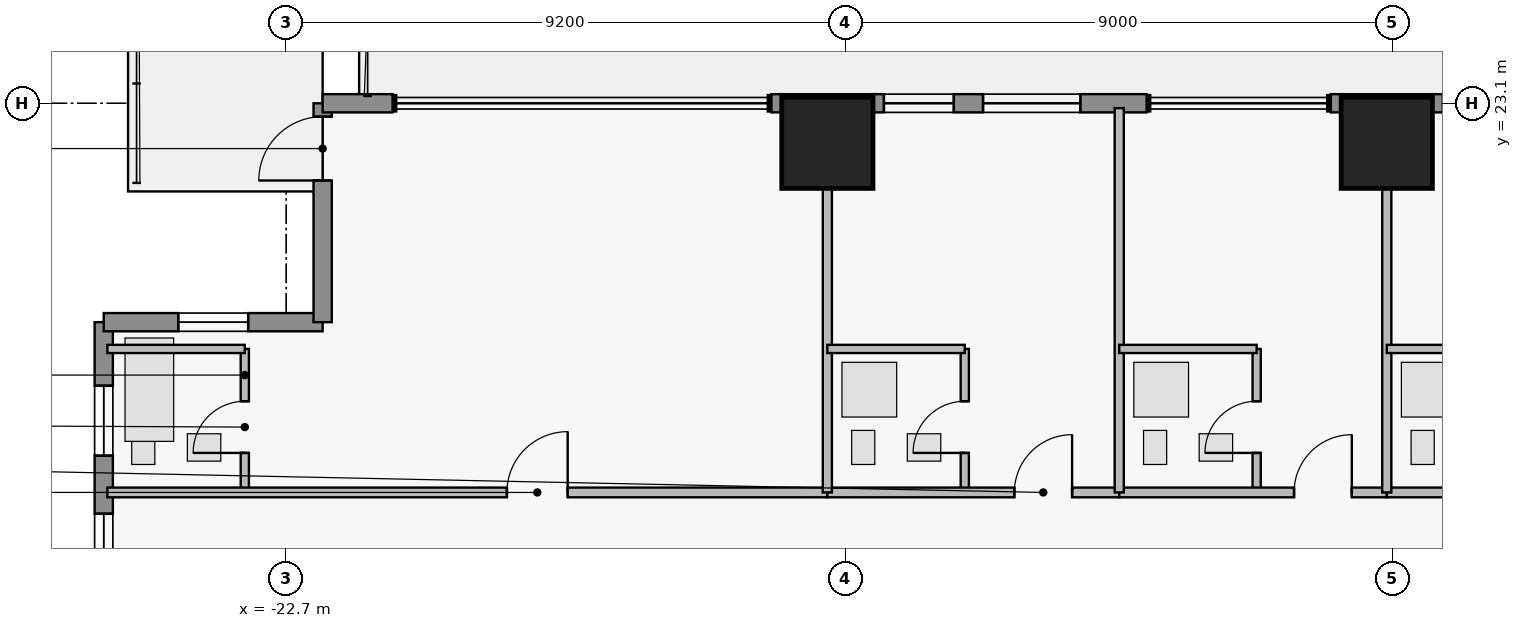
"""IFC4 building model, lengths in metres.
Left out: names, types, materials, properties, quantities, classifications, styles, units other than length and angle.
Written with IfcOpenShell. Run it as: python <this file> out.ifc"""

import sys

from ifc_helpers import new_model, si_unit, direction, frame, frame_2d, origin, origin_2d, place, context, subcontext, project, spatial, rectangle, extrude, element, fill, save


model = new_model("IFC4")
c1 = context("Model", 3, precision=1e-05, world=origin(), true_north=direction((0.0, 1.0)))
c2 = subcontext(c1, "Body", "Model", "MODEL_VIEW")
j1 = project(units=[si_unit("LENGTHUNIT", "METRE"), si_unit("PLANEANGLEUNIT", "RADIAN")], contexts=[c1])
p1 = place(None, origin())
s1 = spatial("IfcSite", under=j1, at=p1, CompositionType="ELEMENT")
p2 = place(p1, origin())
s2 = spatial("IfcBuilding", under=s1, at=p2, CompositionType="ELEMENT")
p3 = place(p2, frame((0.0, 0.0, 60.45)))
s3 = spatial("IfcBuildingStorey", under=s2, at=p3, CompositionType="ELEMENT", Elevation=60.45)
for number, where, z_axis, x_axis in (
    (1, (-13.8, 22.45, 0.0), (0.0, 0.0, 1.0), (1.0, 0.0, 0.0)),
    (2, (-4.6, 22.45, 0.0), (0.0, 0.0, 1.0), (1.0, 0.0, 0.0)),
):
    element("IfcColumn", number, at=place(p3, frame(where, z_axis=z_axis, x_axis=x_axis)), inside=s3, PredefinedType="COLUMN", context=c2, shape_type="SweptSolid", body=[
        extrude(rectangle(XDim=1.5, YDim=1.5, at=origin_2d()), origin(), (0.0, 0.0, 1.0), 3.65),
    ])
p4 = place(p3, frame((-25.7, 14.4, 0.0), z_axis=(0.0, 0.0, 1.0), x_axis=(0.0, 1.0, 0.0)))
e3 = element("IfcWall", 3, at=p4, inside=s3, PredefinedType="STANDARD", context=c2, shape_type="SweptSolid", body=[
    extrude(rectangle(XDim=5.1, YDim=0.3, at=frame_2d((2.55, 0.0))), origin(), (0.0, 0.0, 1.0), 3.43),
])
p5 = place(p4, frame((0.8, 0.0, 0.95)))
e4 = element("IfcOpeningElement", 4, at=p5, cuts=e3, PredefinedType="OPENING", context=c2, shape_type="SweptSolid", body=[
    extrude(rectangle(XDim=1.15, YDim=1.55, at=frame_2d((0.575, 0.775))), frame((0.0, 0.16, 0.0), z_axis=(0.0, -1.0, 0.0), x_axis=(1.0, 0.0, 0.0)), (0.0, 0.0, 1.0), 0.32),
])
p6 = place(p4, frame((2.905, 0.0, 0.95)))
e5 = element("IfcOpeningElement", 5, at=p6, cuts=e3, PredefinedType="OPENING", context=c2, shape_type="SweptSolid", body=[
    extrude(rectangle(XDim=1.15, YDim=1.55, at=frame_2d((0.575, 0.775))), frame((0.0, 0.16, 0.0), z_axis=(0.0, -1.0, 0.0), x_axis=(1.0, 0.0, 0.0)), (0.0, 0.0, 1.0), 0.32),
])
p7 = place(p3, frame((-25.7, 19.5, 0.0), z_axis=(0.0, 0.0, 1.0), x_axis=(1.0, 0.0, 0.0)))
e6 = element("IfcWall", 6, at=p7, inside=s3, PredefinedType="STANDARD", context=c2, shape_type="SweptSolid", body=[
    extrude(rectangle(XDim=3.6, YDim=0.3, at=frame_2d((1.8, 0.0))), origin(), (0.0, 0.0, 1.0), 3.43),
])
p8 = place(p7, frame((1.225, 0.0, 1.25)))
e7 = element("IfcOpeningElement", 7, at=p8, cuts=e6, PredefinedType="OPENING", context=c2, shape_type="SweptSolid", body=[
    extrude(rectangle(XDim=1.15, YDim=1.55, at=frame_2d((0.575, 0.775))), frame((0.0, 0.16, 0.0), z_axis=(0.0, -1.0, 0.0), x_axis=(1.0, 0.0, 0.0)), (0.0, 0.0, 1.0), 0.32),
])
p9 = place(p3, frame((-22.1, 19.5, 0.0), z_axis=(0.0, 0.0, 1.0), x_axis=(0.0, 1.0, 0.0)))
e8 = element("IfcWall", 8, at=p9, inside=s3, PredefinedType="STANDARD", context=c2, shape_type="SweptSolid", body=[
    extrude(rectangle(XDim=3.6, YDim=0.3, at=frame_2d((1.8, 0.0))), origin(), (0.0, 0.0, 1.0), 3.43),
])
p10 = place(p9, frame((2.33, 0.0, 0.0)))
e9 = element("IfcOpeningElement", 9, at=p10, cuts=e8, PredefinedType="OPENING", context=c2, shape_type="SweptSolid", body=[
    extrude(rectangle(XDim=1.05, YDim=2.2, at=frame_2d((0.525, 1.1))), frame((0.0, 0.16, 0.0), z_axis=(0.0, -1.0, 0.0), x_axis=(1.0, 0.0, 0.0)), (0.0, 0.0, 1.0), 0.32),
])
p11 = place(p3, frame((-22.1, 23.1, 0.0), z_axis=(0.0, 0.0, 1.0), x_axis=(1.0, 0.0, 0.0)))
e10 = element("IfcWall", 10, at=p11, inside=s3, PredefinedType="STANDARD", context=c2, shape_type="SweptSolid", body=[
    extrude(rectangle(XDim=1.15, YDim=0.3, at=frame_2d((0.575, 0.0))), origin(), (0.0, 0.0, 1.0), 3.43),
])
p12 = place(p3, frame((-14.72, 23.1, 0.0), z_axis=(0.0, 0.0, 1.0), x_axis=(1.0, 0.0, 0.0)))
e11 = element("IfcWall", 11, at=p12, inside=s3, PredefinedType="STANDARD", context=c2, shape_type="SweptSolid", body=[
    extrude(rectangle(XDim=6.17, YDim=0.3, at=frame_2d((3.085, 0.0))), origin(), (0.0, 0.0, 1.0), 3.43),
])
p13 = place(p12, frame((3.48, 0.0, 0.85)))
e12 = element("IfcOpeningElement", 12, at=p13, cuts=e11, PredefinedType="OPENING", context=c2, shape_type="SweptSolid", body=[
    extrude(rectangle(XDim=1.6, YDim=1.8, at=frame_2d((0.8, 0.9))), frame((0.0, 0.16, 0.0), z_axis=(0.0, -1.0, 0.0), x_axis=(1.0, 0.0, 0.0)), (0.0, 0.0, 1.0), 0.32),
])
p14 = place(p12, frame((1.85, 0.0, 0.95)))
e13 = element("IfcOpeningElement", 13, at=p14, cuts=e11, PredefinedType="OPENING", context=c2, shape_type="SweptSolid", body=[
    extrude(rectangle(XDim=1.15, YDim=1.55, at=frame_2d((0.575, 0.775))), frame((0.0, 0.16, 0.0), z_axis=(0.0, -1.0, 0.0), x_axis=(1.0, 0.0, 0.0)), (0.0, 0.0, 1.0), 0.32),
])
p15 = place(p3, frame((-5.52, 23.1, 0.0), z_axis=(0.0, 0.0, 1.0), x_axis=(1.0, 0.0, 0.0)))
e14 = element("IfcWall", 14, at=p15, inside=s3, PredefinedType="STANDARD", context=c2, shape_type="SweptSolid", body=[
    extrude(rectangle(XDim=1.84, YDim=0.3, at=frame_2d((0.92, 0.0))), origin(), (0.0, 0.0, 1.0), 3.43),
])
p16 = place(p3, frame((-23.38, 16.7, 0.0), z_axis=(0.0, 0.0, 1.0), x_axis=(0.0, 1.0, 0.0)))
e15 = element("IfcWall", 15, at=p16, inside=s3, PredefinedType="PLUMBINGWALL", context=c2, shape_type="SweptSolid", body=[
    extrude(rectangle(XDim=2.36, YDim=0.135, at=frame_2d((1.18, 0.0))), origin(), (0.0, 0.0, 1.0), 3.43),
])
p17 = place(p16, frame((0.65, 0.0, 0.0)))
e16 = element("IfcOpeningElement", 16, at=p17, cuts=e15, PredefinedType="OPENING", context=c2, shape_type="SweptSolid", body=[
    extrude(rectangle(XDim=0.85, YDim=2.1, at=frame_2d((0.425, 1.05))), frame((0.0, 0.077, 0.0), z_axis=(0.0, -1.0, 0.0), x_axis=(1.0, 0.0, 0.0)), (0.0, 0.0, 1.0), 0.155),
])
p18 = place(p3, frame((-25.64, 16.7, 0.0), z_axis=(0.0, 0.0, 1.0), x_axis=(1.0, 0.0, 0.0)))
e17 = element("IfcWall", 17, at=p18, inside=s3, PredefinedType="PARTITIONING", context=c2, shape_type="SweptSolid", body=[
    extrude(rectangle(XDim=11.84, YDim=0.16, at=frame_2d((5.92, 0.0))), origin(), (0.0, 0.0, 1.0), 3.43),
])
p19 = place(p18, frame((6.57, 0.0, 0.0)))
e18 = element("IfcOpeningElement", 18, at=p19, cuts=e17, PredefinedType="OPENING", context=c2, shape_type="SweptSolid", body=[
    extrude(rectangle(XDim=1.0, YDim=2.15, at=frame_2d((0.5, 1.075))), frame((0.0, 0.09, 0.0), z_axis=(0.0, -1.0, 0.0), x_axis=(1.0, 0.0, 0.0)), (0.0, 0.0, 1.0), 0.18),
])
p20 = place(p3, frame((-11.54, 16.7, 0.0), z_axis=(0.0, 0.0, 1.0), x_axis=(0.0, 1.0, 0.0)))
e19 = element("IfcWall", 19, at=p20, inside=s3, PredefinedType="PLUMBINGWALL", context=c2, shape_type="SweptSolid", body=[
    extrude(rectangle(XDim=2.36, YDim=0.135, at=frame_2d((1.18, 0.0))), origin(), (0.0, 0.0, 1.0), 3.43),
])
p21 = place(p20, frame((0.65, 0.0, 0.0)))
e20 = element("IfcOpeningElement", 20, at=p21, cuts=e19, PredefinedType="OPENING", context=c2, shape_type="SweptSolid", body=[
    extrude(rectangle(XDim=0.85, YDim=2.1, at=frame_2d((0.425, 1.05))), frame((0.0, 0.077, 0.0), z_axis=(0.0, -1.0, 0.0), x_axis=(1.0, 0.0, 0.0)), (0.0, 0.0, 1.0), 0.155),
])
p22 = place(p3, frame((-13.8, 16.7, 0.0), z_axis=(0.0, 0.0, 1.0), x_axis=(1.0, 0.0, 0.0)))
e21 = element("IfcWall", 21, at=p22, inside=s3, PredefinedType="PARTITIONING", context=c2, shape_type="SweptSolid", body=[
    extrude(rectangle(XDim=4.8, YDim=0.16, at=frame_2d((2.4, 0.0))), origin(), (0.0, 0.0, 1.0), 2.973),
])
p23 = place(p22, frame((3.075, 0.0, 0.0)))
e22 = element("IfcOpeningElement", 22, at=p23, cuts=e21, PredefinedType="OPENING", context=c2, shape_type="SweptSolid", body=[
    extrude(rectangle(XDim=0.95, YDim=2.15, at=frame_2d((0.475, 1.075))), frame((0.0, 0.09, 0.0), z_axis=(0.0, -1.0, 0.0), x_axis=(1.0, 0.0, 0.0)), (0.0, 0.0, 1.0), 0.18),
])
p24 = place(p3, frame((-6.74, 16.7, 0.0), z_axis=(0.0, 0.0, 1.0), x_axis=(0.0, 1.0, 0.0)))
e23 = element("IfcWall", 23, at=p24, inside=s3, PredefinedType="PLUMBINGWALL", context=c2, shape_type="SweptSolid", body=[
    extrude(rectangle(XDim=2.36, YDim=0.135, at=frame_2d((1.18, 0.0))), origin(), (0.0, 0.0, 1.0), 3.43),
])
p25 = place(p24, frame((0.65, 0.0, 0.0)))
e24 = element("IfcOpeningElement", 24, at=p25, cuts=e23, PredefinedType="OPENING", context=c2, shape_type="SweptSolid", body=[
    extrude(rectangle(XDim=0.85, YDim=2.1, at=frame_2d((0.425, 1.05))), frame((0.0, 0.077, 0.0), z_axis=(0.0, -1.0, 0.0), x_axis=(1.0, 0.0, 0.0)), (0.0, 0.0, 1.0), 0.155),
])
p26 = place(p3, frame((-9.0, 16.7, 0.0), z_axis=(0.0, 0.0, 1.0), x_axis=(1.0, 0.0, 0.0)))
e25 = element("IfcWall", 25, at=p26, inside=s3, PredefinedType="PARTITIONING", context=c2, shape_type="SweptSolid", body=[
    extrude(rectangle(XDim=4.4, YDim=0.16, at=frame_2d((2.2, 0.0))), origin(), (0.0, 0.0, 1.0), 2.973),
])
p27 = place(p26, frame((2.875, 0.0, 0.0)))
e26 = element("IfcOpeningElement", 26, at=p27, cuts=e25, PredefinedType="OPENING", context=c2, shape_type="SweptSolid", body=[
    extrude(rectangle(XDim=0.95, YDim=2.15, at=frame_2d((0.475, 1.075))), frame((0.0, 0.09, 0.0), z_axis=(0.0, -1.0, 0.0), x_axis=(1.0, 0.0, 0.0)), (0.0, 0.0, 1.0), 0.18),
])
p28 = place(p3, frame((-4.6, 16.7, 0.0), z_axis=(0.0, 0.0, 1.0), x_axis=(1.0, 0.0, 0.0)))
e27 = element("IfcWall", 27, at=p28, inside=s3, PredefinedType="PARTITIONING", context=c2, shape_type="SweptSolid", body=[
    extrude(rectangle(XDim=4.6, YDim=0.16, at=frame_2d((2.3, 0.0))), origin(), (0.0, 0.0, 1.0), 2.973),
])
p29 = place(p28, frame((2.975, 0.0, 0.0)))
e28 = element("IfcOpeningElement", 28, at=p29, cuts=e27, PredefinedType="OPENING", context=c2, shape_type="SweptSolid", body=[
    extrude(rectangle(XDim=0.95, YDim=2.15, at=frame_2d((0.475, 1.075))), frame((0.0, 0.09, 0.0), z_axis=(0.0, -1.0, 0.0), x_axis=(1.0, 0.0, 0.0)), (0.0, 0.0, 1.0), 0.18),
])
p30 = place(p3, frame((-25.64, 19.06, 0.0), z_axis=(0.0, 0.0, 1.0), x_axis=(1.0, 0.0, 0.0)))
e29 = element("IfcWall", 29, at=p30, inside=s3, PredefinedType="PLUMBINGWALL", context=c2, shape_type="SweptSolid", body=[
    extrude(rectangle(XDim=2.26, YDim=0.135, at=frame_2d((1.13, 0.0))), origin(), (0.0, 0.0, 1.0), 3.43),
])
p31 = place(p3, frame((-13.8, 16.7, 0.0), z_axis=(0.0, 0.0, 1.0), x_axis=(0.0, 1.0, 0.0)))
e30 = element("IfcWall", 30, at=p31, inside=s3, PredefinedType="PARTITIONING", context=c2, shape_type="SweptSolid", body=[
    extrude(rectangle(XDim=6.32, YDim=0.15, at=frame_2d((3.16, 0.0))), origin(), (0.0, 0.0, 1.0), 2.668),
])
p32 = place(p3, frame((-13.8, 19.06, 0.0), z_axis=(0.0, 0.0, 1.0), x_axis=(1.0, 0.0, 0.0)))
e31 = element("IfcWall", 31, at=p32, inside=s3, PredefinedType="PLUMBINGWALL", context=c2, shape_type="SweptSolid", body=[
    extrude(rectangle(XDim=2.26, YDim=0.135, at=frame_2d((1.13, 0.0))), origin(), (0.0, 0.0, 1.0), 2.973),
])
p33 = place(p3, frame((-9.0, 16.7, 0.0), z_axis=(0.0, 0.0, 1.0), x_axis=(0.0, 1.0, 0.0)))
e32 = element("IfcWall", 32, at=p33, inside=s3, PredefinedType="PARTITIONING", context=c2, shape_type="SweptSolid", body=[
    extrude(rectangle(XDim=6.32, YDim=0.15, at=frame_2d((3.16, 0.0))), origin(), (0.0, 0.0, 1.0), 3.43),
])
p34 = place(p3, frame((-9.0, 19.06, 0.0), z_axis=(0.0, 0.0, 1.0), x_axis=(1.0, 0.0, 0.0)))
e33 = element("IfcWall", 33, at=p34, inside=s3, PredefinedType="PLUMBINGWALL", context=c2, shape_type="SweptSolid", body=[
    extrude(rectangle(XDim=2.26, YDim=0.135, at=frame_2d((1.13, 0.0))), origin(), (0.0, 0.0, 1.0), 2.973),
])
p35 = place(p3, frame((-4.6, 16.7, 0.0), z_axis=(0.0, 0.0, 1.0), x_axis=(0.0, 1.0, 0.0)))
e34 = element("IfcWall", 34, at=p35, inside=s3, PredefinedType="PARTITIONING", context=c2, shape_type="SweptSolid", body=[
    extrude(rectangle(XDim=6.32, YDim=0.15, at=frame_2d((3.16, 0.0))), origin(), (0.0, 0.0, 1.0), 2.668),
])
p36 = place(p3, frame((-4.6, 19.06, 0.0), z_axis=(0.0, 0.0, 1.0), x_axis=(1.0, 0.0, 0.0)))
e35 = element("IfcWall", 35, at=p36, inside=s3, PredefinedType="PLUMBINGWALL", context=c2, shape_type="SweptSolid", body=[
    extrude(rectangle(XDim=2.26, YDim=0.135, at=frame_2d((1.13, 0.0))), origin(), (0.0, 0.0, 1.0), 2.973),
])
p37 = place(p5, origin())
e36 = element("IfcWindow", 36, at=p37, inside=s3, PartitioningType="SINGLE_PANEL", PredefinedType="WINDOW", context=c2, shape_type="SweptSolid", body=[
    extrude(rectangle(XDim=1.15, YDim=1.55, at=frame_2d((0.575, 0.775))), frame((0.0, 0.03, 0.0), z_axis=(0.0, -1.0, 0.0), x_axis=(1.0, 0.0, 0.0)), (0.0, 0.0, 1.0), 0.06),
])
fill(e4, e36)
p38 = place(p6, origin())
e37 = element("IfcWindow", 37, at=p38, inside=s3, PartitioningType="SINGLE_PANEL", PredefinedType="WINDOW", context=c2, shape_type="SweptSolid", body=[
    extrude(rectangle(XDim=1.15, YDim=1.55, at=frame_2d((0.575, 0.775))), frame((0.0, 0.03, 0.0), z_axis=(0.0, -1.0, 0.0), x_axis=(1.0, 0.0, 0.0)), (0.0, 0.0, 1.0), 0.06),
])
fill(e5, e37)
p39 = place(p8, origin())
e38 = element("IfcWindow", 38, at=p39, inside=s3, PartitioningType="SINGLE_PANEL", PredefinedType="WINDOW", context=c2, shape_type="SweptSolid", body=[
    extrude(rectangle(XDim=1.15, YDim=1.55, at=frame_2d((0.575, 0.775))), frame((0.0, 0.03, 0.0), z_axis=(0.0, -1.0, 0.0), x_axis=(1.0, 0.0, 0.0)), (0.0, 0.0, 1.0), 0.06),
])
fill(e7, e38)
p40 = place(p10, origin())
e39 = element("IfcDoor", 39, at=p40, inside=s3, OperationType="SINGLE_SWING_LEFT", PredefinedType="DOOR", context=c2, shape_type="SweptSolid", body=[
    extrude(rectangle(XDim=1.05, YDim=2.2, at=frame_2d((0.525, 1.1))), frame((0.0, 0.025, 0.0), z_axis=(0.0, -1.0, 0.0), x_axis=(1.0, 0.0, 0.0)), (0.0, 0.0, 1.0), 0.05),
])
fill(e9, e39)
p41 = place(p13, origin())
e40 = element("IfcWindow", 40, at=p41, inside=s3, PartitioningType="SINGLE_PANEL", PredefinedType="WINDOW", context=c2, shape_type="SweptSolid", body=[
    extrude(rectangle(XDim=1.6, YDim=1.8, at=frame_2d((0.8, 0.9))), frame((0.0, 0.03, 0.0), z_axis=(0.0, -1.0, 0.0), x_axis=(1.0, 0.0, 0.0)), (0.0, 0.0, 1.0), 0.06),
])
fill(e12, e40)
p42 = place(p14, origin())
e41 = element("IfcWindow", 41, at=p42, inside=s3, PartitioningType="SINGLE_PANEL", PredefinedType="WINDOW", context=c2, shape_type="SweptSolid", body=[
    extrude(rectangle(XDim=1.15, YDim=1.55, at=frame_2d((0.575, 0.775))), frame((0.0, 0.03, 0.0), z_axis=(0.0, -1.0, 0.0), x_axis=(1.0, 0.0, 0.0)), (0.0, 0.0, 1.0), 0.06),
])
fill(e13, e41)
p43 = place(p17, origin())
e42 = element("IfcDoor", 42, at=p43, inside=s3, OperationType="SINGLE_SWING_LEFT", PredefinedType="DOOR", context=c2, shape_type="SweptSolid", body=[
    extrude(rectangle(XDim=0.85, YDim=2.1, at=frame_2d((0.425, 1.05))), frame((0.0, 0.025, 0.0), z_axis=(0.0, -1.0, 0.0), x_axis=(1.0, 0.0, 0.0)), (0.0, 0.0, 1.0), 0.05),
])
fill(e16, e42)
p44 = place(p19, origin())
e43 = element("IfcDoor", 43, at=p44, inside=s3, OperationType="SINGLE_SWING_RIGHT", PredefinedType="DOOR", context=c2, shape_type="SweptSolid", body=[
    extrude(rectangle(XDim=1.0, YDim=2.15, at=frame_2d((0.5, 1.075))), frame((0.0, 0.025, 0.0), z_axis=(0.0, -1.0, 0.0), x_axis=(1.0, 0.0, 0.0)), (0.0, 0.0, 1.0), 0.05),
])
fill(e18, e43)
p45 = place(p21, origin())
e44 = element("IfcDoor", 44, at=p45, inside=s3, OperationType="SINGLE_SWING_LEFT", PredefinedType="DOOR", context=c2, shape_type="SweptSolid", body=[
    extrude(rectangle(XDim=0.85, YDim=2.1, at=frame_2d((0.425, 1.05))), frame((0.0, 0.025, 0.0), z_axis=(0.0, -1.0, 0.0), x_axis=(1.0, 0.0, 0.0)), (0.0, 0.0, 1.0), 0.05),
])
fill(e20, e44)
p46 = place(p23, origin())
e45 = element("IfcDoor", 45, at=p46, inside=s3, OperationType="SINGLE_SWING_RIGHT", PredefinedType="DOOR", context=c2, shape_type="SweptSolid", body=[
    extrude(rectangle(XDim=0.95, YDim=2.15, at=frame_2d((0.475, 1.075))), frame((0.0, 0.025, 0.0), z_axis=(0.0, -1.0, 0.0), x_axis=(1.0, 0.0, 0.0)), (0.0, 0.0, 1.0), 0.05),
])
fill(e22, e45)
p47 = place(p25, origin())
e46 = element("IfcDoor", 46, at=p47, inside=s3, OperationType="SINGLE_SWING_LEFT", PredefinedType="DOOR", context=c2, shape_type="SweptSolid", body=[
    extrude(rectangle(XDim=0.85, YDim=2.1, at=frame_2d((0.425, 1.05))), frame((0.0, 0.025, 0.0), z_axis=(0.0, -1.0, 0.0), x_axis=(1.0, 0.0, 0.0)), (0.0, 0.0, 1.0), 0.05),
])
fill(e24, e46)
p48 = place(p27, origin())
e47 = element("IfcDoor", 47, at=p48, inside=s3, OperationType="SINGLE_SWING_RIGHT", PredefinedType="DOOR", context=c2, shape_type="SweptSolid", body=[
    extrude(rectangle(XDim=0.95, YDim=2.15, at=frame_2d((0.475, 1.075))), frame((0.0, 0.025, 0.0), z_axis=(0.0, -1.0, 0.0), x_axis=(1.0, 0.0, 0.0)), (0.0, 0.0, 1.0), 0.05),
])
fill(e26, e47)
save(model, sys.argv[1])
